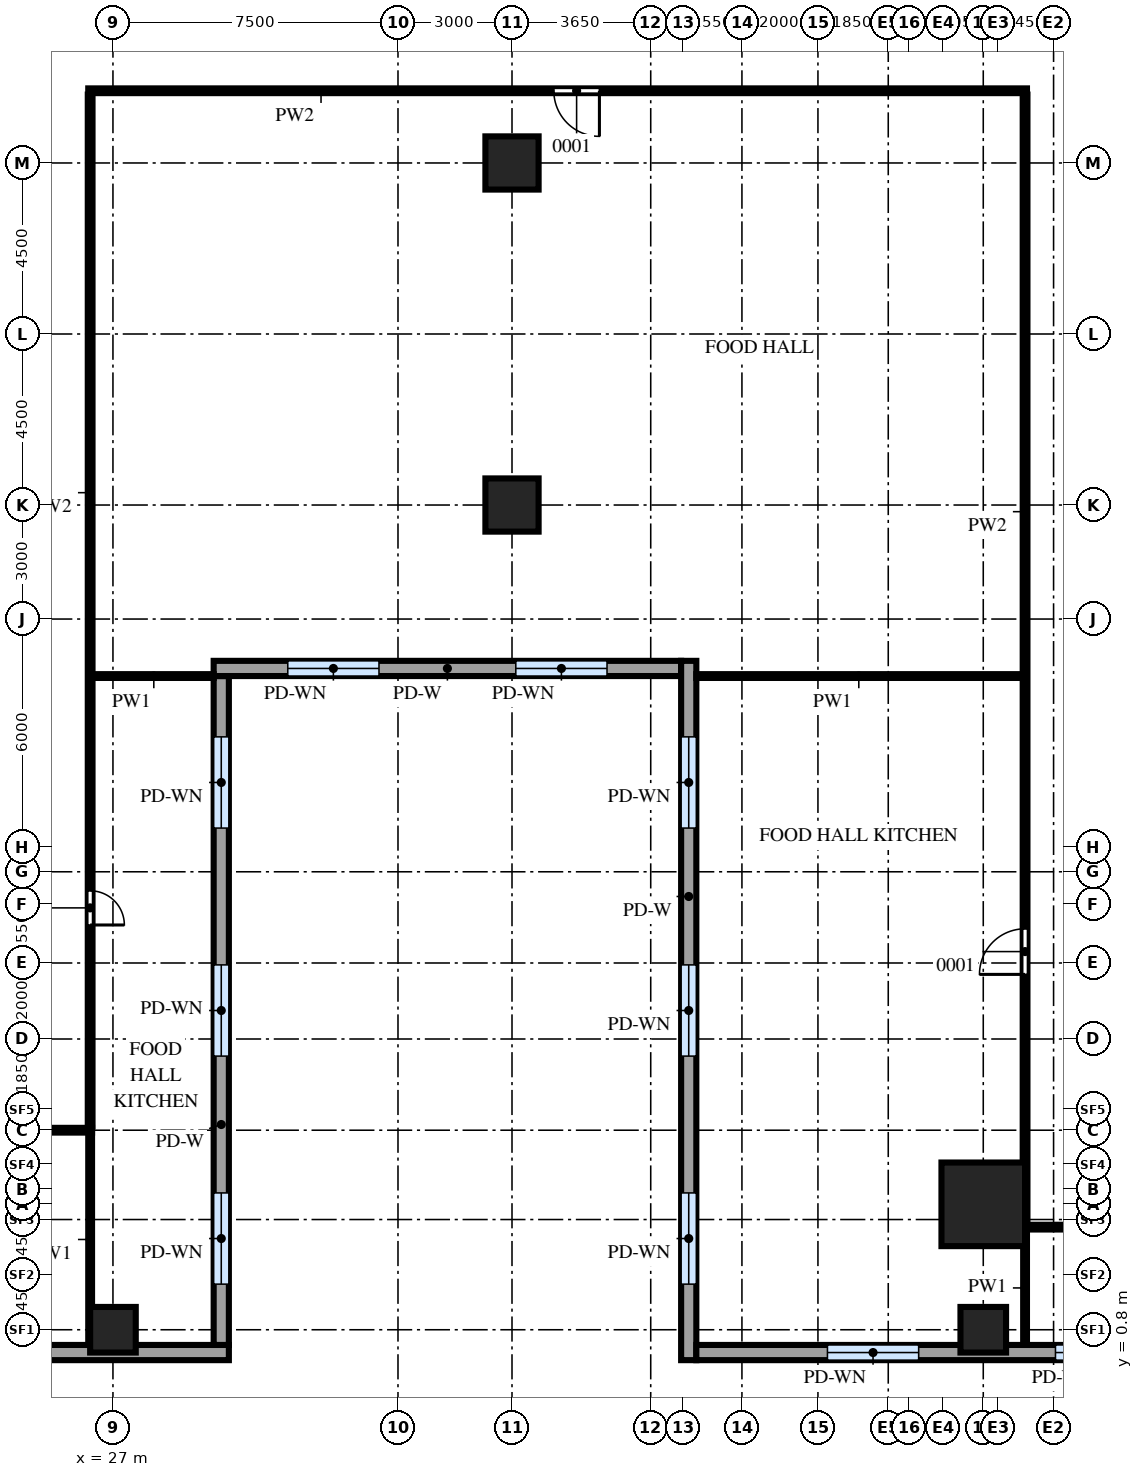
"""IFC4 building model, lengths in metres.
Left out: names, types, materials, properties, quantities, classifications, styles, units other than length and angle.
Written with IfcOpenShell. Run it as: python <this file> out.ifc"""

import sys

from ifc_helpers import new_model, si_unit, direction, frame, frame_2d, origin, origin_2d, place, context, subcontext, project, spatial, rectangle, extrude, source, transform, mapped, element, fill, save


model = new_model("IFC4")
c1 = context("Model", 3, precision=1e-05, world=origin(), true_north=direction((0.0, 1.0)))
c2 = subcontext(c1, "Body", "Model", "MODEL_VIEW")
j1 = project(units=[si_unit("LENGTHUNIT", "METRE"), si_unit("PLANEANGLEUNIT", "RADIAN")], contexts=[c1])
p1 = place(None, origin())
s1 = spatial("IfcSite", under=j1, at=p1, CompositionType="ELEMENT")
p2 = place(p1, origin())
s2 = spatial("IfcBuilding", under=s1, at=p2, CompositionType="ELEMENT")
p3 = place(p2, frame((0.0, 0.0, 13.0)))
s3 = spatial("IfcBuildingStorey", under=s2, at=p3, CompositionType="ELEMENT", Elevation=13.0)
m1 = source(origin(), c2, "Body", "SweptSolid", [
    extrude(rectangle(XDim=2.2, YDim=2.2, at=origin_2d()), origin(), (0.0, 0.0, 1.0), 5.2),
])
p4 = place(p3, frame((49.9, 4.1, 0.0), z_axis=(0.0, 0.0, 1.0), x_axis=(1.0, 0.0, 0.0)))
e1 = element("IfcColumn", 1, at=p4, inside=s3, PredefinedType="COLUMN", context=c2, shape_type="MappedRepresentation", body=[
    mapped(m1, transform((0.0, 0.0, 0.0))),
])
m2 = source(origin(), c2, "Body", "SweptSolid", [
    extrude(rectangle(XDim=1.2, YDim=1.2, at=origin_2d()), origin(), (0.0, 0.0, 1.0), 5.2),
])
for number, where, z_axis, x_axis in (
    (2, (27.0, 0.8, 0.0), (0.0, 0.0, 1.0), (1.0, 0.0, 0.0)),
    (3, (49.9, 0.8, 0.0), (0.0, 0.0, 1.0), (1.0, 0.0, 0.0)),
):
    element("IfcColumn", number, at=place(p3, frame(where, z_axis=z_axis, x_axis=x_axis)), inside=s3, PredefinedType="COLUMN", context=c2, shape_type="MappedRepresentation", body=[
        mapped(m2, transform((0.0, 0.0, 0.0))),
    ])
m3 = source(origin(), c2, "Body", "SweptSolid", [
    extrude(rectangle(XDim=1.4, YDim=1.4, at=origin_2d()), origin(), (0.0, 0.0, 1.0), 5.2),
])
for number, where, z_axis, x_axis in (
    (4, (37.5, 22.5, 0.0), (0.0, 0.0, 1.0), (1.0, 0.0, 0.0)),
    (5, (37.5, 31.5, 0.0), (0.0, 0.0, 1.0), (1.0, 0.0, 0.0)),
):
    element("IfcColumn", number, at=place(p3, frame(where, z_axis=z_axis, x_axis=x_axis)), inside=s3, PredefinedType="COLUMN", context=c2, shape_type="MappedRepresentation", body=[
        mapped(m3, transform((0.0, 0.0, 0.0))),
    ])
m4 = source(origin(), c2, "Body", "SweptSolid", [
    extrude(rectangle(XDim=31.84, YDim=0.4, at=frame_2d((15.92, 0.0))), origin(), (0.0, 0.0, 1.0), 5.2),
])
p5 = place(p3, frame((-1.79, 0.2, 0.0), z_axis=(0.0, 0.0, 1.0), x_axis=(1.0, 0.0, 0.0)))
e6 = element("IfcWall", 6, at=p5, inside=s3, PredefinedType="SOLIDWALL", context=c2, shape_type="MappedRepresentation", body=[
    mapped(m4, transform((0.0, 0.0, 0.0))),
])
m5 = source(origin(), c2, "Body", "SweptSolid", [
    extrude(rectangle(XDim=2.4, YDim=2.4, at=frame_2d((1.2, 1.2))), frame((0.0, 0.21, 0.0), z_axis=(0.0, -1.0, 0.0), x_axis=(1.0, 0.0, 0.0)), (0.0, 0.0, 1.0), 0.42),
])
p6 = place(p5, frame((2.7, 0.0, 1.0)))
e7 = element("IfcOpeningElement", 7, at=p6, cuts=e6, PredefinedType="OPENING", context=c2, shape_type="MappedRepresentation", body=[
    mapped(m5, transform((0.0, 0.0, 0.0))),
])
p7 = place(p5, frame((8.7, 0.0, 1.0)))
e8 = element("IfcOpeningElement", 8, at=p7, cuts=e6, PredefinedType="OPENING", context=c2, shape_type="MappedRepresentation", body=[
    mapped(m5, transform((0.0, 0.0, 0.0))),
])
p8 = place(p5, frame((14.7, 0.0, 1.0)))
e9 = element("IfcOpeningElement", 9, at=p8, cuts=e6, PredefinedType="OPENING", context=c2, shape_type="MappedRepresentation", body=[
    mapped(m5, transform((0.0, 0.0, 0.0))),
])
m6 = source(origin(), c2, "Body", "SweptSolid", [
    extrude(rectangle(XDim=17.6, YDim=0.4, at=frame_2d((8.8, 0.0))), origin(), (0.0, 0.0, 1.0), 5.2),
])
p9 = place(p3, frame((29.85, 0.4, 0.0), z_axis=(0.0, 0.0, 1.0), x_axis=(0.0, 1.0, 0.0)))
e10 = element("IfcWall", 10, at=p9, inside=s3, PredefinedType="SOLIDWALL", context=c2, shape_type="MappedRepresentation", body=[
    mapped(m6, transform((0.0, 0.0, 0.0))),
])
p10 = place(p9, frame((1.6, 0.0, 1.0)))
e11 = element("IfcOpeningElement", 11, at=p10, cuts=e10, PredefinedType="OPENING", context=c2, shape_type="MappedRepresentation", body=[
    mapped(m5, transform((0.0, 0.0, 0.0))),
])
p11 = place(p9, frame((7.6, 0.0, 1.0)))
e12 = element("IfcOpeningElement", 12, at=p11, cuts=e10, PredefinedType="OPENING", context=c2, shape_type="MappedRepresentation", body=[
    mapped(m5, transform((0.0, 0.0, 0.0))),
])
p12 = place(p9, frame((13.6, 0.0, 1.0)))
e13 = element("IfcOpeningElement", 13, at=p12, cuts=e10, PredefinedType="OPENING", context=c2, shape_type="MappedRepresentation", body=[
    mapped(m5, transform((0.0, 0.0, 0.0))),
])
m7 = source(origin(), c2, "Body", "SweptSolid", [
    extrude(rectangle(XDim=12.3, YDim=0.4, at=frame_2d((6.15, 0.0))), origin(), (0.0, 0.0, 1.0), 5.2),
])
p13 = place(p3, frame((29.65, 18.2, 0.0), z_axis=(0.0, 0.0, 1.0), x_axis=(1.0, 0.0, 0.0)))
e14 = element("IfcWall", 14, at=p13, inside=s3, PredefinedType="SOLIDWALL", context=c2, shape_type="MappedRepresentation", body=[
    mapped(m7, transform((0.0, 0.0, 0.0))),
])
p14 = place(p13, frame((1.95, 0.0, 1.0)))
e15 = element("IfcOpeningElement", 15, at=p14, cuts=e14, PredefinedType="OPENING", context=c2, shape_type="MappedRepresentation", body=[
    mapped(m5, transform((0.0, 0.0, 0.0))),
])
p15 = place(p13, frame((7.95, 0.0, 1.0)))
e16 = element("IfcOpeningElement", 16, at=p15, cuts=e14, PredefinedType="OPENING", context=c2, shape_type="MappedRepresentation", body=[
    mapped(m5, transform((0.0, 0.0, 0.0))),
])
m8 = source(origin(), c2, "Body", "SweptSolid", [
    extrude(rectangle(XDim=18.4, YDim=0.4, at=frame_2d((9.2, 0.0))), origin(), (0.0, 0.0, 1.0), 5.2),
])
p16 = place(p3, frame((42.15, 18.4, 0.0), z_axis=(0.0, 0.0, 1.0), x_axis=(0.0, -1.0, 0.0)))
e17 = element("IfcWall", 17, at=p16, inside=s3, PredefinedType="SOLIDWALL", context=c2, shape_type="MappedRepresentation", body=[
    mapped(m8, transform((0.0, 0.0, 0.0))),
])
p17 = place(p16, frame((2.0, 0.0, 1.0)))
e18 = element("IfcOpeningElement", 18, at=p17, cuts=e17, PredefinedType="OPENING", context=c2, shape_type="MappedRepresentation", body=[
    mapped(m5, transform((0.0, 0.0, 0.0))),
])
p18 = place(p16, frame((8.0, 0.0, 1.0)))
e19 = element("IfcOpeningElement", 19, at=p18, cuts=e17, PredefinedType="OPENING", context=c2, shape_type="MappedRepresentation", body=[
    mapped(m5, transform((0.0, 0.0, 0.0))),
])
p19 = place(p16, frame((14.0, 0.0, 1.0)))
e20 = element("IfcOpeningElement", 20, at=p19, cuts=e17, PredefinedType="OPENING", context=c2, shape_type="MappedRepresentation", body=[
    mapped(m5, transform((0.0, 0.0, 0.0))),
])
m9 = source(origin(), c2, "Body", "SweptSolid", [
    extrude(rectangle(XDim=27.34, YDim=0.4, at=frame_2d((13.67, 0.0))), origin(), (0.0, 0.0, 1.0), 5.2),
])
p20 = place(p3, frame((42.35, 0.2, 0.0), z_axis=(0.0, 0.0, 1.0), x_axis=(1.0, 0.0, 0.0)))
e21 = element("IfcWall", 21, at=p20, inside=s3, PredefinedType="SOLIDWALL", context=c2, shape_type="MappedRepresentation", body=[
    mapped(m9, transform((0.0, 0.0, 0.0))),
])
p21 = place(p20, frame((3.45, 0.0, 1.0)))
e22 = element("IfcOpeningElement", 22, at=p21, cuts=e21, PredefinedType="OPENING", context=c2, shape_type="MappedRepresentation", body=[
    mapped(m5, transform((0.0, 0.0, 0.0))),
])
p22 = place(p20, frame((9.45, 0.0, 1.0)))
e23 = element("IfcOpeningElement", 23, at=p22, cuts=e21, PredefinedType="OPENING", context=c2, shape_type="MappedRepresentation", body=[
    mapped(m5, transform((0.0, 0.0, 0.0))),
])
p23 = place(p20, frame((15.45, 0.0, 1.0)))
e24 = element("IfcOpeningElement", 24, at=p23, cuts=e21, PredefinedType="OPENING", context=c2, shape_type="MappedRepresentation", body=[
    mapped(m5, transform((0.0, 0.0, 0.0))),
])
p24 = place(p20, frame((21.45, 0.0, 1.0)))
e25 = element("IfcOpeningElement", 25, at=p24, cuts=e21, PredefinedType="OPENING", context=c2, shape_type="MappedRepresentation", body=[
    mapped(m5, transform((0.0, 0.0, 0.0))),
])
m10 = source(origin(), c2, "Body", "SweptSolid", [
    extrude(rectangle(XDim=5.55, YDim=0.1, at=frame_2d((2.775, 0.0))), origin(), (0.0, 0.0, 1.0), 5.2),
])
p25 = place(p3, frame((26.4, 0.4, 0.0), z_axis=(0.0, 0.0, 1.0), x_axis=(0.0, 1.0, 0.0)))
e26 = element("IfcWall", 26, at=p25, inside=s3, PredefinedType="PARTITIONING", context=c2, shape_type="MappedRepresentation", body=[
    mapped(m10, transform((0.0, 0.0, 0.0))),
])
m11 = source(origin(), c2, "Body", "SweptSolid", [
    extrude(rectangle(XDim=3.0, YDim=0.1, at=frame_2d((1.5, 0.0))), origin(), (0.0, 0.0, 1.0), 5.2),
])
p26 = place(p3, frame((51.0, 0.4, 0.0), z_axis=(0.0, 0.0, 1.0), x_axis=(0.0, 1.0, 0.0)))
e27 = element("IfcWall", 27, at=p26, inside=s3, PredefinedType="PARTITIONING", context=c2, shape_type="MappedRepresentation", body=[
    mapped(m11, transform((0.0, 0.0, 0.0))),
])
m12 = source(origin(), c2, "Body", "SweptSolid", [
    extrude(rectangle(XDim=16.1, YDim=0.125, at=frame_2d((8.05, 0.0))), origin(), (0.0, 0.0, 1.0), 5.2),
])
p27 = place(p3, frame((50.95, 3.5, 0.0), z_axis=(0.0, 0.0, 1.0), x_axis=(1.0, 0.0, 0.0)))
e28 = element("IfcWall", 28, at=p27, inside=s3, PredefinedType="PARTITIONING", context=c2, shape_type="MappedRepresentation", body=[
    mapped(m12, transform((0.0, 0.0, 0.0))),
])
m13 = source(origin(), c2, "Body", "SweptSolid", [
    extrude(rectangle(XDim=1.2, YDim=2.1, at=frame_2d((0.6, 1.05))), frame((0.0, 0.073, 0.0), z_axis=(0.0, -1.0, 0.0), x_axis=(1.0, 0.0, 0.0)), (0.0, 0.0, 1.0), 0.145),
])
p28 = place(p27, frame((7.45, 0.0, 0.0)))
e29 = element("IfcOpeningElement", 29, at=p28, cuts=e28, PredefinedType="OPENING", context=c2, shape_type="MappedRepresentation", body=[
    mapped(m13, transform((0.0, 0.0, 0.0))),
])
m14 = source(origin(), c2, "Body", "SweptSolid", [
    extrude(rectangle(XDim=29.7, YDim=0.125, at=frame_2d((14.85, 0.0))), origin(), (0.0, 0.0, 1.0), 5.2),
])
p29 = place(p3, frame((51.0, 3.6, 0.0), z_axis=(0.0, 0.0, 1.0), x_axis=(0.0, 1.0, 0.0)))
e30 = element("IfcWall", 30, at=p29, inside=s3, PredefinedType="PARTITIONING", context=c2, shape_type="MappedRepresentation", body=[
    mapped(m14, transform((0.0, 0.0, 0.0))),
])
p30 = place(p29, frame((6.55, 0.0, 0.0)))
e31 = element("IfcOpeningElement", 31, at=p30, cuts=e30, PredefinedType="OPENING", context=c2, shape_type="MappedRepresentation", body=[
    mapped(m13, transform((0.0, 0.0, 0.0))),
])
m15 = source(origin(), c2, "Body", "SweptSolid", [
    extrude(rectangle(XDim=22.3, YDim=0.125, at=frame_2d((11.15, 0.0))), origin(), (0.0, 0.0, 1.0), 5.2),
])
p31 = place(p3, frame((4.15, 6.05, 0.0), z_axis=(0.0, 0.0, 1.0), x_axis=(1.0, 0.0, 0.0)))
e32 = element("IfcWall", 32, at=p31, inside=s3, PredefinedType="PARTITIONING", context=c2, shape_type="MappedRepresentation", body=[
    mapped(m15, transform((0.0, 0.0, 0.0))),
])
p32 = place(p31, frame((9.2, 0.0, 0.0)))
e33 = element("IfcOpeningElement", 33, at=p32, cuts=e32, PredefinedType="OPENING", context=c2, shape_type="MappedRepresentation", body=[
    mapped(m13, transform((0.0, 0.0, 0.0))),
])
m16 = source(origin(), c2, "Body", "SweptSolid", [
    extrude(rectangle(XDim=27.15, YDim=0.125, at=frame_2d((13.575, 0.0))), origin(), (0.0, 0.0, 1.0), 5.2),
])
p33 = place(p3, frame((26.4, 6.15, 0.0), z_axis=(0.0, 0.0, 1.0), x_axis=(0.0, 1.0, 0.0)))
e34 = element("IfcWall", 34, at=p33, inside=s3, PredefinedType="PARTITIONING", context=c2, shape_type="MappedRepresentation", body=[
    mapped(m16, transform((0.0, 0.0, 0.0))),
])
m17 = source(origin(), c2, "Body", "SweptSolid", [
    extrude(rectangle(XDim=0.9, YDim=2.1, at=frame_2d((0.45, 1.05))), frame((0.0, 0.073, 0.0), z_axis=(0.0, -1.0, 0.0), x_axis=(1.0, 0.0, 0.0)), (0.0, 0.0, 1.0), 0.145),
])
p34 = place(p33, frame((5.3, 0.0, 0.0)))
e35 = element("IfcOpeningElement", 35, at=p34, cuts=e34, PredefinedType="OPENING", context=c2, shape_type="MappedRepresentation", body=[
    mapped(m17, transform((0.0, 0.0, 0.0))),
])
m18 = source(origin(), c2, "Body", "SweptSolid", [
    extrude(rectangle(XDim=3.15, YDim=0.1, at=frame_2d((1.575, 0.0))), origin(), (0.0, 0.0, 1.0), 5.2),
])
p35 = place(p3, frame((26.5, 18.0, 0.0), z_axis=(0.0, 0.0, 1.0), x_axis=(1.0, 0.0, 0.0)))
e36 = element("IfcWall", 36, at=p35, inside=s3, PredefinedType="PARTITIONING", context=c2, shape_type="MappedRepresentation", body=[
    mapped(m18, transform((0.0, 0.0, 0.0))),
])
m19 = source(origin(), c2, "Body", "SweptSolid", [
    extrude(rectangle(XDim=8.55, YDim=0.1, at=frame_2d((4.275, 0.0))), origin(), (0.0, 0.0, 1.0), 5.2),
])
p36 = place(p3, frame((42.35, 18.0, 0.0), z_axis=(0.0, 0.0, 1.0), x_axis=(1.0, 0.0, 0.0)))
e37 = element("IfcWall", 37, at=p36, inside=s3, PredefinedType="PARTITIONING", context=c2, shape_type="MappedRepresentation", body=[
    mapped(m19, transform((0.0, 0.0, 0.0))),
])
m20 = source(origin(), c2, "Body", "SweptSolid", [
    extrude(rectangle(XDim=24.7, YDim=0.125, at=frame_2d((12.35, 0.0))), origin(), (0.0, 0.0, 1.0), 5.2),
])
p37 = place(p3, frame((26.35, 33.4, 0.0), z_axis=(0.0, 0.0, 1.0), x_axis=(1.0, 0.0, 0.0)))
e38 = element("IfcWall", 38, at=p37, inside=s3, PredefinedType="PARTITIONING", context=c2, shape_type="MappedRepresentation", body=[
    mapped(m20, transform((0.0, 0.0, 0.0))),
])
p38 = place(p37, frame((12.25, 0.0, 0.0)))
e39 = element("IfcOpeningElement", 39, at=p38, cuts=e38, PredefinedType="OPENING", context=c2, shape_type="MappedRepresentation", body=[
    mapped(m13, transform((0.0, 0.0, 0.0))),
])
m21 = source(origin(), c2, "Body", "SweptSolid", [
    extrude(rectangle(XDim=2.4, YDim=2.4, at=frame_2d((1.2, 1.2))), frame((0.0, 0.03, 0.0), z_axis=(0.0, -1.0, 0.0), x_axis=(1.0, 0.0, 0.0)), (0.0, 0.0, 1.0), 0.06),
])
p39 = place(p10, origin())
e40 = element("IfcWindow", 40, at=p39, inside=s3, PartitioningType="SINGLE_PANEL", PredefinedType="WINDOW", context=c2, shape_type="MappedRepresentation", body=[
    mapped(m21, transform((0.0, 0.0, 0.0))),
])
fill(e11, e40)
p40 = place(p11, origin())
e41 = element("IfcWindow", 41, at=p40, inside=s3, PartitioningType="SINGLE_PANEL", PredefinedType="WINDOW", context=c2, shape_type="MappedRepresentation", body=[
    mapped(m21, transform((0.0, 0.0, 0.0))),
])
fill(e12, e41)
p41 = place(p12, origin())
e42 = element("IfcWindow", 42, at=p41, inside=s3, PartitioningType="SINGLE_PANEL", PredefinedType="WINDOW", context=c2, shape_type="MappedRepresentation", body=[
    mapped(m21, transform((0.0, 0.0, 0.0))),
])
fill(e13, e42)
p42 = place(p14, origin())
e43 = element("IfcWindow", 43, at=p42, inside=s3, PartitioningType="SINGLE_PANEL", PredefinedType="WINDOW", context=c2, shape_type="MappedRepresentation", body=[
    mapped(m21, transform((0.0, 0.0, 0.0))),
])
fill(e15, e43)
p43 = place(p15, origin())
e44 = element("IfcWindow", 44, at=p43, inside=s3, PartitioningType="SINGLE_PANEL", PredefinedType="WINDOW", context=c2, shape_type="MappedRepresentation", body=[
    mapped(m21, transform((0.0, 0.0, 0.0))),
])
fill(e16, e44)
p44 = place(p17, origin())
e45 = element("IfcWindow", 45, at=p44, inside=s3, PartitioningType="SINGLE_PANEL", PredefinedType="WINDOW", context=c2, shape_type="MappedRepresentation", body=[
    mapped(m21, transform((0.0, 0.0, 0.0))),
])
fill(e18, e45)
p45 = place(p18, origin())
e46 = element("IfcWindow", 46, at=p45, inside=s3, PartitioningType="SINGLE_PANEL", PredefinedType="WINDOW", context=c2, shape_type="MappedRepresentation", body=[
    mapped(m21, transform((0.0, 0.0, 0.0))),
])
fill(e19, e46)
p46 = place(p19, origin())
e47 = element("IfcWindow", 47, at=p46, inside=s3, PartitioningType="SINGLE_PANEL", PredefinedType="WINDOW", context=c2, shape_type="MappedRepresentation", body=[
    mapped(m21, transform((0.0, 0.0, 0.0))),
])
fill(e20, e47)
p47 = place(p21, origin())
e48 = element("IfcWindow", 48, at=p47, inside=s3, PartitioningType="SINGLE_PANEL", PredefinedType="WINDOW", context=c2, shape_type="MappedRepresentation", body=[
    mapped(m21, transform((0.0, 0.0, 0.0))),
])
fill(e22, e48)
p48 = place(p22, origin())
e49 = element("IfcWindow", 49, at=p48, inside=s3, PartitioningType="SINGLE_PANEL", PredefinedType="WINDOW", context=c2, shape_type="MappedRepresentation", body=[
    mapped(m21, transform((0.0, 0.0, 0.0))),
])
fill(e23, e49)
m22 = source(origin(), c2, "Body", "SweptSolid", [
    extrude(rectangle(XDim=0.9, YDim=2.1, at=frame_2d((0.45, 1.05))), frame((0.0, 0.025, 0.0), z_axis=(0.0, -1.0, 0.0), x_axis=(1.0, 0.0, 0.0)), (0.0, 0.0, 1.0), 0.05),
])
p49 = place(p34, origin())
e50 = element("IfcDoor", 50, at=p49, inside=s3, OperationType="SINGLE_SWING_LEFT", PredefinedType="DOOR", context=c2, shape_type="MappedRepresentation", body=[
    mapped(m22, transform((0.0, 0.0, 0.0))),
])
fill(e35, e50)
m23 = source(origin(), c2, "Body", "SweptSolid", [
    extrude(rectangle(XDim=1.2, YDim=2.1, at=frame_2d((0.6, 1.05))), frame((0.0, 0.025, 0.0), z_axis=(0.0, -1.0, 0.0), x_axis=(1.0, 0.0, 0.0)), (0.0, 0.0, 1.0), 0.05),
])
p50 = place(p30, origin())
e51 = element("IfcDoor", 51, at=p50, inside=s3, OperationType="SINGLE_SWING_RIGHT", PredefinedType="DOOR", context=c2, shape_type="MappedRepresentation", body=[
    mapped(m23, transform((0.0, 0.0, 0.0))),
])
fill(e31, e51)
p51 = place(p38, origin())
e52 = element("IfcDoor", 52, at=p51, inside=s3, OperationType="SINGLE_SWING_RIGHT", PredefinedType="DOOR", context=c2, shape_type="MappedRepresentation", body=[
    mapped(m23, transform((0.0, 0.0, 0.0))),
])
fill(e39, e52)
save(model, sys.argv[1])
